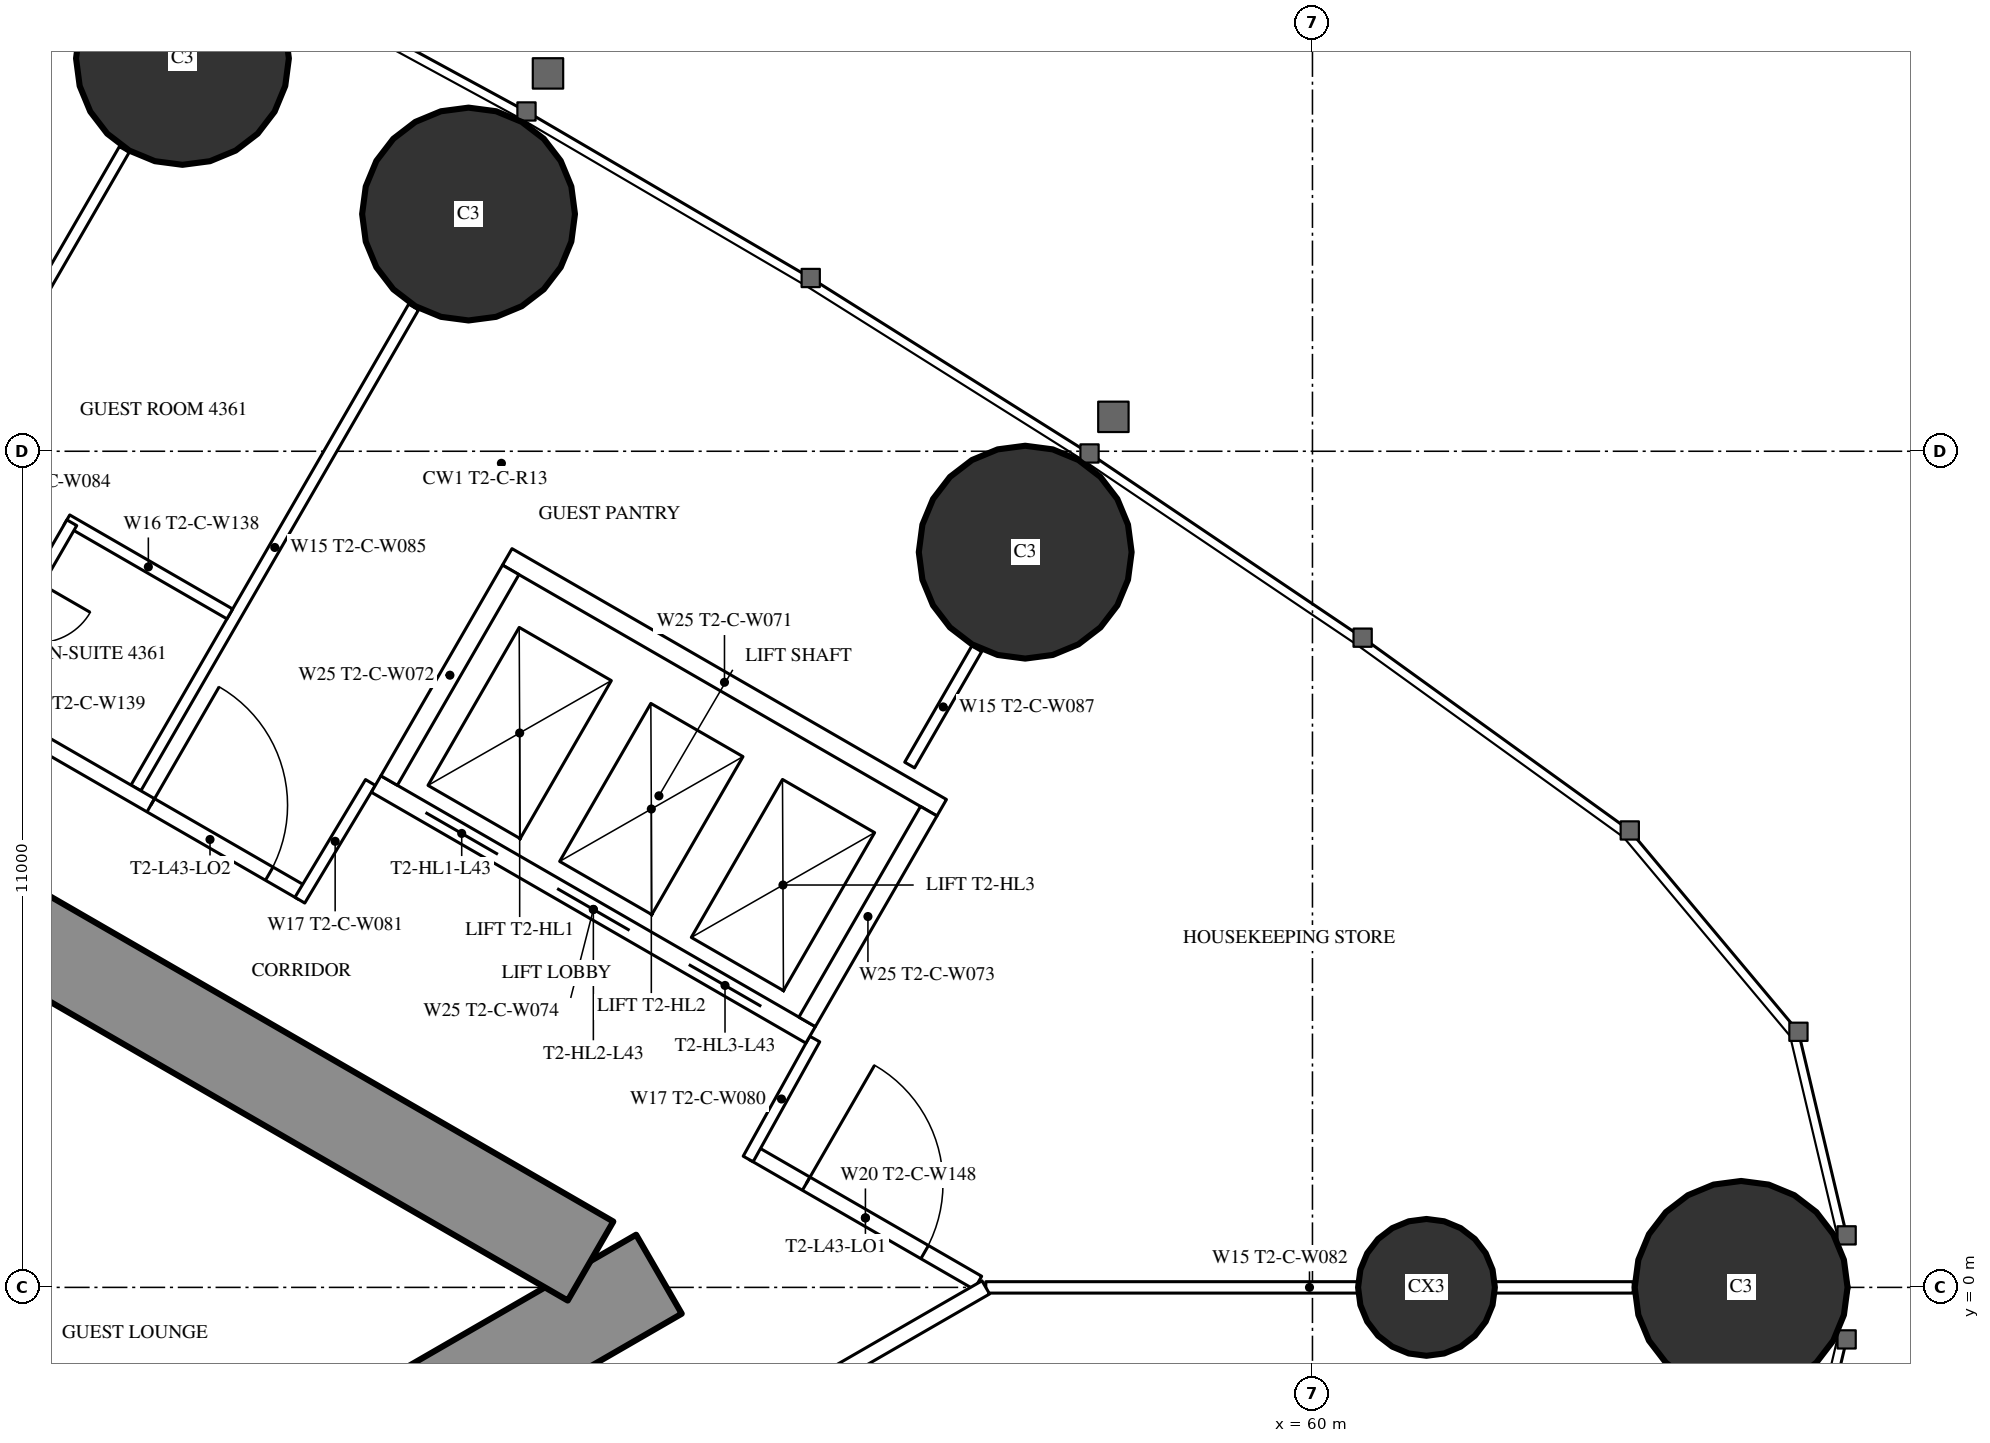
"""IFC4 building model, lengths in metres.
Left out: names, types, materials, properties, quantities, classifications, styles, units other than length and angle.
Written with IfcOpenShell. Run it as: python <this file> out.ifc"""

import sys

from ifc_helpers import new_model, si_unit, direction, frame, frame_2d, origin, origin_2d, place, context, subcontext, project, spatial, rectangle, circle, extrude, element, fill, save


model = new_model("IFC4")
c1 = context("Model", 3, precision=1e-05, world=origin(), true_north=direction((0.0, 1.0)))
c2 = subcontext(c1, "Body", "Model", "MODEL_VIEW")
j1 = project(units=[si_unit("LENGTHUNIT", "METRE"), si_unit("PLANEANGLEUNIT", "RADIAN")], contexts=[c1])
p1 = place(None, origin())
s1 = spatial("IfcSite", under=j1, at=p1, CompositionType="ELEMENT")
p2 = place(p1, origin())
s2 = spatial("IfcBuilding", under=s1, at=p2, CompositionType="ELEMENT")
p3 = place(p2, frame((0.0, 0.0, 163.3)))
s3 = spatial("IfcBuildingStorey", under=s2, at=p3, CompositionType="ELEMENT", Elevation=163.3)
for number, where, z_axis, x_axis in (
    (1, (65.64, 0.0, 0.0), (0.0, 0.0, 1.0), (1.0, 0.0, 0.0)),
    (2, (56.221, 9.672, 0.0), (0.0, 0.0, 1.0), (1.0, 0.0, 0.0)),
    (3, (48.897, 14.121, 0.0), (0.0, 0.0, 1.0), (1.0, 0.0, 0.0)),
    (4, (45.134, 16.168, 0.0), (0.0, 0.0, 1.0), (1.0, 0.0, 0.0)),
):
    element("IfcColumn", number, at=place(p3, frame(where, z_axis=z_axis, x_axis=x_axis)), inside=s3, PredefinedType="COLUMN", context=c2, shape_type="SweptSolid", body=[
        extrude(circle(Radius=1.4, at=origin_2d()), origin(), (0.0, 0.0, 1.0), 3.5),
    ])
p4 = place(p3, frame((61.5, 0.0, 0.0), z_axis=(0.0, 0.0, 1.0), x_axis=(1.0, 0.0, 0.0)))
e5 = element("IfcColumn", 5, at=p4, inside=s3, PredefinedType="COLUMN", context=c2, shape_type="SweptSolid", body=[
    extrude(circle(Radius=0.9, at=origin_2d()), origin(), (0.0, 0.0, 1.0), 3.5),
])
p5 = place(p3, frame((27.2, -13.8, 0.0), z_axis=(0.0, 0.0, 1.0), x_axis=(0.866027159892, 0.499996958321, 0.0)))
e6 = element("IfcWall", 6, at=p5, inside=s3, PredefinedType="SHEAR", context=c2, shape_type="SweptSolid", body=[
    extrude(rectangle(XDim=27.947, YDim=1.2, at=frame_2d((13.973, 0.0))), origin(), (0.0, 0.0, 1.0), 3.5),
])
p6 = place(p5, frame((4.6, 0.0, 0.0)))
e7 = element("IfcOpeningElement", 7, at=p6, cuts=e6, PredefinedType="OPENING", context=c2, shape_type="SweptSolid", body=[
    extrude(rectangle(XDim=1.0, YDim=2.2, at=frame_2d((0.5, 1.1))), frame((0.0, 0.61, 0.0), z_axis=(0.0, -1.0, 0.0), x_axis=(1.0, 0.0, 0.0)), (0.0, 0.0, 1.0), 1.22),
])
p7 = place(p5, frame((13.395, 0.0, 0.0)))
e8 = element("IfcOpeningElement", 8, at=p7, cuts=e6, PredefinedType="OPENING", context=c2, shape_type="SweptSolid", body=[
    extrude(rectangle(XDim=1.8, YDim=2.2, at=frame_2d((0.9, 1.1))), frame((0.0, 0.61, 0.0), z_axis=(0.0, -1.0, 0.0), x_axis=(1.0, 0.0, 0.0)), (0.0, 0.0, 1.0), 1.22),
])
p8 = place(p3, frame((27.2, 13.8, 0.0), z_axis=(0.0, 0.0, 1.0), x_axis=(0.866024515034, -0.500001539357, 0.0)))
e9 = element("IfcWall", 9, at=p8, inside=s3, PredefinedType="SHEAR", context=c2, shape_type="SweptSolid", body=[
    extrude(rectangle(XDim=26.907, YDim=1.2, at=frame_2d((13.454, 0.0))), origin(), (0.0, 0.0, 1.0), 3.5),
])
p9 = place(p8, frame((4.6, 0.0, 0.0)))
e10 = element("IfcOpeningElement", 10, at=p9, cuts=e9, PredefinedType="OPENING", context=c2, shape_type="SweptSolid", body=[
    extrude(rectangle(XDim=1.0, YDim=2.2, at=frame_2d((0.5, 1.1))), frame((0.0, 0.61, 0.0), z_axis=(0.0, -1.0, 0.0), x_axis=(1.0, 0.0, 0.0)), (0.0, 0.0, 1.0), 1.22),
])
p10 = place(p8, frame((13.395, 0.0, 0.0)))
e11 = element("IfcOpeningElement", 11, at=p10, cuts=e9, PredefinedType="OPENING", context=c2, shape_type="SweptSolid", body=[
    extrude(rectangle(XDim=1.8, YDim=2.2, at=frame_2d((0.9, 1.1))), frame((0.0, 0.61, 0.0), z_axis=(0.0, -1.0, 0.0), x_axis=(1.0, 0.0, 0.0)), (0.0, 0.0, 1.0), 1.22),
])
p11 = place(p3, frame((40.769, 8.737, 0.0), z_axis=(0.0, 0.0, 1.0), x_axis=(0.500013115284, 0.866017831539, 0.0)))
e12 = element("IfcWall", 12, at=p11, inside=s3, PredefinedType="PARTITIONING", context=c2, shape_type="SweptSolid", body=[
    extrude(rectangle(XDim=7.198, YDim=0.15, at=frame_2d((3.599, 0.0))), origin(), (0.0, 0.0, 1.0), 2.3),
])
p12 = place(p3, frame((44.521, 6.571, 0.0), z_axis=(0.0, 0.0, 1.0), x_axis=(0.500020376429, 0.866013639128, 0.0)))
e13 = element("IfcWall", 13, at=p12, inside=s3, PredefinedType="PARTITIONING", context=c2, shape_type="SweptSolid", body=[
    extrude(rectangle(XDim=7.306, YDim=0.15, at=frame_2d((3.653, 0.0))), origin(), (0.0, 0.0, 1.0), 2.3),
])
p13 = place(p3, frame((55.702, 0.0, 0.0), z_axis=(0.0, 0.0, 1.0), x_axis=(1.0, 0.0, 0.0)))
e14 = element("IfcWall", 14, at=p13, inside=s3, PredefinedType="PARTITIONING", context=c2, shape_type="SweptSolid", body=[
    extrude(rectangle(XDim=8.518, YDim=0.15, at=frame_2d((4.259, 0.0))), origin(), (0.0, 0.0, 1.0), 2.3),
])
p14 = place(p3, frame((54.7, 6.872, 0.0), z_axis=(0.0, 0.0, 1.0), x_axis=(0.499989690894, 0.866031355668, 0.0)))
e15 = element("IfcWall", 15, at=p14, inside=s3, PredefinedType="PARTITIONING", context=c2, shape_type="SweptSolid", body=[
    extrude(rectangle(XDim=1.766, YDim=0.15, at=frame_2d((0.883, 0.0))), origin(), (0.0, 0.0, 1.0), 3.25),
])
p15 = place(p3, frame((27.959, 16.017, 0.0), z_axis=(0.0, 0.0, 1.0), x_axis=(0.866027146794, -0.499996981007, 0.0)))
e16 = element("IfcWall", 16, at=p15, inside=s3, PredefinedType="PARTITIONING", context=c2, shape_type="SweptSolid", body=[
    extrude(rectangle(XDim=21.657, YDim=0.2, at=frame_2d((10.829, 0.0))), origin(), (0.0, 0.0, 1.0), 3.25),
])
p16 = place(p15, frame((15.391, 0.0, 0.0)))
e17 = element("IfcOpeningElement", 17, at=p16, cuts=e16, PredefinedType="OPENING", context=c2, shape_type="SweptSolid", body=[
    extrude(rectangle(XDim=0.95, YDim=2.2, at=frame_2d((0.475, 1.1))), frame((0.0, 0.11, 0.0), z_axis=(0.0, -1.0, 0.0), x_axis=(1.0, 0.0, 0.0)), (0.0, 0.0, 1.0), 0.22),
])
p17 = place(p15, frame((13.409, 0.0, 0.0)))
e18 = element("IfcOpeningElement", 18, at=p17, cuts=e16, PredefinedType="OPENING", context=c2, shape_type="SweptSolid", body=[
    extrude(rectangle(XDim=0.95, YDim=2.2, at=frame_2d((0.475, 1.1))), frame((0.0, 0.11, 0.0), z_axis=(0.0, -1.0, 0.0), x_axis=(1.0, 0.0, 0.0)), (0.0, 0.0, 1.0), 0.22),
])
p18 = place(p15, frame((0.6, 0.0, 0.0)))
e19 = element("IfcOpeningElement", 19, at=p18, cuts=e16, PredefinedType="OPENING", context=c2, shape_type="SweptSolid", body=[
    extrude(rectangle(XDim=0.95, YDim=2.2, at=frame_2d((0.475, 1.1))), frame((0.0, 0.11, 0.0), z_axis=(0.0, -1.0, 0.0), x_axis=(1.0, 0.0, 0.0)), (0.0, 0.0, 1.0), 0.22),
])
p19 = place(p15, frame((19.349, 0.0, 0.0)))
e20 = element("IfcOpeningElement", 20, at=p19, cuts=e16, PredefinedType="OPENING", context=c2, shape_type="SweptSolid", body=[
    extrude(rectangle(XDim=1.8, YDim=2.2, at=frame_2d((0.9, 1.1))), frame((0.0, 0.11, 0.0), z_axis=(0.0, -1.0, 0.0), x_axis=(1.0, 0.0, 0.0)), (0.0, 0.0, 1.0), 0.22),
])
p20 = place(p3, frame((52.639, 1.769, 0.0), z_axis=(0.0, 0.0, 1.0), x_axis=(0.866027340901, -0.4999966448, 0.0)))
e21 = element("IfcWall", 21, at=p20, inside=s3, PredefinedType="PARTITIONING", context=c2, shape_type="SweptSolid", body=[
    extrude(rectangle(XDim=3.417, YDim=0.2, at=frame_2d((1.708, 0.0))), origin(), (0.0, 0.0, 1.0), 3.25),
])
p21 = place(p20, frame((0.809, 0.0, 0.0)))
e22 = element("IfcOpeningElement", 22, at=p21, cuts=e21, PredefinedType="OPENING", context=c2, shape_type="SweptSolid", body=[
    extrude(rectangle(XDim=1.8, YDim=2.2, at=frame_2d((0.9, 1.1))), frame((0.0, 0.11, 0.0), z_axis=(0.0, -1.0, 0.0), x_axis=(1.0, 0.0, 0.0)), (0.0, 0.0, 1.0), 0.22),
])
p22 = place(p3, frame((52.576, 1.689, 0.0), z_axis=(0.0, 0.0, 1.0), x_axis=(0.485424724123, 0.874278466629, 0.0)))
e23 = element("IfcWall", 23, at=p22, inside=s3, PredefinedType="PARTITIONING", context=c2, shape_type="SweptSolid", body=[
    extrude(rectangle(XDim=1.805, YDim=0.15, at=frame_2d((0.903, 0.0))), origin(), (0.0, 0.0, 1.0), 3.25),
])
p23 = place(p3, frame((47.606, 6.643, 0.0), z_axis=(0.0, 0.0, 1.0), x_axis=(-0.514237157483, -0.857648031458, 0.0)))
e24 = element("IfcWall", 24, at=p23, inside=s3, PredefinedType="PARTITIONING", context=c2, shape_type="SweptSolid", body=[
    extrude(rectangle(XDim=1.805, YDim=0.15, at=frame_2d((0.902, 0.0))), origin(), (0.0, 0.0, 1.0), 3.25),
])
p24 = place(p3, frame((40.741, -8.638, 0.0), z_axis=(0.0, 0.0, 1.0), x_axis=(0.866022967338, 0.500004220025, 0.0)))
e25 = element("IfcWall", 25, at=p24, inside=s3, PredefinedType="PARTITIONING", context=c2, shape_type="SweptSolid", body=[
    extrude(rectangle(XDim=17.276, YDim=0.2, at=frame_2d((8.638, 0.0))), origin(), (0.0, 0.0, 1.0), 3.25),
])
p25 = place(p24, frame((7.316, 0.0, 0.0)))
e26 = element("IfcOpeningElement", 26, at=p25, cuts=e25, PredefinedType="OPENING", context=c2, shape_type="SweptSolid", body=[
    extrude(rectangle(XDim=0.95, YDim=2.2, at=frame_2d((0.475, 1.1))), frame((0.0, 0.11, 0.0), z_axis=(0.0, -1.0, 0.0), x_axis=(1.0, 0.0, 0.0)), (0.0, 0.0, 1.0), 0.22),
])
p26 = place(p24, frame((11.366, 0.0, 0.0)))
e27 = element("IfcOpeningElement", 27, at=p26, cuts=e25, PredefinedType="OPENING", context=c2, shape_type="SweptSolid", body=[
    extrude(rectangle(XDim=0.95, YDim=2.2, at=frame_2d((0.475, 1.1))), frame((0.0, 0.11, 0.0), z_axis=(0.0, -1.0, 0.0), x_axis=(1.0, 0.0, 0.0)), (0.0, 0.0, 1.0), 0.22),
])
p27 = place(p24, frame((13.347, 0.0, 0.0)))
e28 = element("IfcOpeningElement", 28, at=p27, cuts=e25, PredefinedType="OPENING", context=c2, shape_type="SweptSolid", body=[
    extrude(rectangle(XDim=0.95, YDim=2.2, at=frame_2d((0.475, 1.1))), frame((0.0, 0.11, 0.0), z_axis=(0.0, -1.0, 0.0), x_axis=(1.0, 0.0, 0.0)), (0.0, 0.0, 1.0), 0.22),
])
p28 = place(p3, frame((43.613, 10.097, 0.0), z_axis=(0.0, 0.0, 1.0), x_axis=(0.866031185235, -0.4999899861, 0.0)))
e29 = element("IfcWall", 29, at=p28, inside=s3, PredefinedType="PARTITIONING", context=c2, shape_type="SweptSolid", body=[
    extrude(rectangle(XDim=2.475, YDim=0.15, at=frame_2d((1.238, 0.0))), origin(), (0.0, 0.0, 1.0), 3.25),
])
p29 = place(p3, frame((42.378, 7.808, 0.0), z_axis=(0.0, 0.0, 1.0), x_axis=(0.500006934395, 0.866021400173, 0.0)))
e30 = element("IfcWall", 30, at=p29, inside=s3, PredefinedType="PARTITIONING", context=c2, shape_type="SweptSolid", body=[
    extrude(rectangle(XDim=2.6, YDim=0.15, at=frame_2d((1.3, 0.0))), origin(), (0.0, 0.0, 1.0), 3.25),
])
p30 = place(p29, frame((0.9, 0.0, 0.0)))
e31 = element("IfcOpeningElement", 31, at=p30, cuts=e30, PredefinedType="OPENING", context=c2, shape_type="SweptSolid", body=[
    extrude(rectangle(XDim=0.8, YDim=2.2, at=frame_2d((0.4, 1.1))), frame((0.0, 0.085, 0.0), z_axis=(0.0, -1.0, 0.0), x_axis=(1.0, 0.0, 0.0)), (0.0, 0.0, 1.0), 0.17),
])
p31 = place(p3, frame((47.681, 6.622, 0.0), z_axis=(0.0, 0.0, 1.0), x_axis=(0.86603344179, -0.499986077507, 0.0)))
e32 = element("IfcWall", 32, at=p31, inside=s3, PredefinedType="PARTITIONING", context=c2, shape_type="SweptSolid", body=[
    extrude(rectangle(XDim=6.6, YDim=0.25, at=frame_2d((3.3, 0.0))), origin(), (0.0, 0.0, 1.0), 3.25),
])
p32 = place(p31, frame((0.75, 0.0, 0.0)))
e33 = element("IfcOpeningElement", 33, at=p32, cuts=e32, PredefinedType="OPENING", context=c2, shape_type="SweptSolid", body=[
    extrude(rectangle(XDim=1.1, YDim=2.2, at=frame_2d((0.55, 1.1))), frame((0.0, 0.135, 0.0), z_axis=(0.0, -1.0, 0.0), x_axis=(1.0, 0.0, 0.0)), (0.0, 0.0, 1.0), 0.27),
])
p33 = place(p31, frame((2.75, 0.0, 0.0)))
e34 = element("IfcOpeningElement", 34, at=p33, cuts=e32, PredefinedType="OPENING", context=c2, shape_type="SweptSolid", body=[
    extrude(rectangle(XDim=1.1, YDim=2.2, at=frame_2d((0.55, 1.1))), frame((0.0, 0.135, 0.0), z_axis=(0.0, -1.0, 0.0), x_axis=(1.0, 0.0, 0.0)), (0.0, 0.0, 1.0), 0.27),
])
p34 = place(p31, frame((4.75, 0.0, 0.0)))
e35 = element("IfcOpeningElement", 35, at=p34, cuts=e32, PredefinedType="OPENING", context=c2, shape_type="SweptSolid", body=[
    extrude(rectangle(XDim=1.1, YDim=2.2, at=frame_2d((0.55, 1.1))), frame((0.0, 0.135, 0.0), z_axis=(0.0, -1.0, 0.0), x_axis=(1.0, 0.0, 0.0)), (0.0, 0.0, 1.0), 0.27),
])
p35 = place(p3, frame((49.406, 9.611, 0.0), z_axis=(0.0, 0.0, 1.0), x_axis=(0.86603344179, -0.499986077507, 0.0)))
e36 = element("IfcWall", 36, at=p35, inside=s3, PredefinedType="PARTITIONING", context=c2, shape_type="SweptSolid", body=[
    extrude(rectangle(XDim=6.6, YDim=0.25, at=frame_2d((3.3, 0.0))), origin(), (0.0, 0.0, 1.0), 3.25),
])
p36 = place(p3, frame((47.852, 6.668, 0.0), z_axis=(0.0, 0.0, 1.0), x_axis=(0.499929347863, 0.866066190972, 0.0)))
e37 = element("IfcWall", 37, at=p36, inside=s3, PredefinedType="PARTITIONING", context=c2, shape_type="SweptSolid", body=[
    extrude(rectangle(XDim=3.201, YDim=0.25, at=frame_2d((1.6, 0.0))), origin(), (0.0, 0.0, 1.0), 3.25),
])
p37 = place(p3, frame((53.352, 3.493, 0.0), z_axis=(0.0, 0.0, 1.0), x_axis=(0.499872130319, 0.866099216793, 0.0)))
e38 = element("IfcWall", 38, at=p37, inside=s3, PredefinedType="PARTITIONING", context=c2, shape_type="SweptSolid", body=[
    extrude(rectangle(XDim=3.2, YDim=0.25, at=frame_2d((1.6, 0.0))), origin(), (0.0, 0.0, 1.0), 3.25),
])
p38 = place(p21, origin())
e39 = element("IfcDoor", 39, at=p38, inside=s3, OperationType="DOUBLE_DOOR_SINGLE_SWING", PredefinedType="DOOR", context=c2, shape_type="SweptSolid", body=[
    extrude(rectangle(XDim=1.8, YDim=2.2, at=frame_2d((0.9, 1.1))), frame((0.0, 0.025, 0.0), z_axis=(0.0, -1.0, 0.0), x_axis=(1.0, 0.0, 0.0)), (0.0, 0.0, 1.0), 0.05),
])
fill(e22, e39)
p39 = place(p19, origin())
e40 = element("IfcDoor", 40, at=p39, inside=s3, OperationType="DOUBLE_DOOR_SINGLE_SWING", PredefinedType="DOOR", context=c2, shape_type="SweptSolid", body=[
    extrude(rectangle(XDim=1.8, YDim=2.2, at=frame_2d((0.9, 1.1))), frame((0.0, 0.025, 0.0), z_axis=(0.0, -1.0, 0.0), x_axis=(1.0, 0.0, 0.0)), (0.0, 0.0, 1.0), 0.05),
])
fill(e20, e40)
p40 = place(p32, origin())
e41 = element("IfcDoor", 41, at=p40, inside=s3, OperationType="DOUBLE_DOOR_SLIDING", PredefinedType="USERDEFINED", context=c2, shape_type="SweptSolid", body=[
    extrude(rectangle(XDim=1.1, YDim=2.2, at=frame_2d((0.55, 1.1))), frame((0.0, 0.025, 0.0), z_axis=(0.0, -1.0, 0.0), x_axis=(1.0, 0.0, 0.0)), (0.0, 0.0, 1.0), 0.05),
])
fill(e33, e41)
p41 = place(p33, origin())
e42 = element("IfcDoor", 42, at=p41, inside=s3, OperationType="DOUBLE_DOOR_SLIDING", PredefinedType="USERDEFINED", context=c2, shape_type="SweptSolid", body=[
    extrude(rectangle(XDim=1.1, YDim=2.2, at=frame_2d((0.55, 1.1))), frame((0.0, 0.025, 0.0), z_axis=(0.0, -1.0, 0.0), x_axis=(1.0, 0.0, 0.0)), (0.0, 0.0, 1.0), 0.05),
])
fill(e34, e42)
p42 = place(p34, origin())
e43 = element("IfcDoor", 43, at=p42, inside=s3, OperationType="DOUBLE_DOOR_SLIDING", PredefinedType="USERDEFINED", context=c2, shape_type="SweptSolid", body=[
    extrude(rectangle(XDim=1.1, YDim=2.2, at=frame_2d((0.55, 1.1))), frame((0.0, 0.025, 0.0), z_axis=(0.0, -1.0, 0.0), x_axis=(1.0, 0.0, 0.0)), (0.0, 0.0, 1.0), 0.05),
])
fill(e35, e43)
save(model, sys.argv[1])
